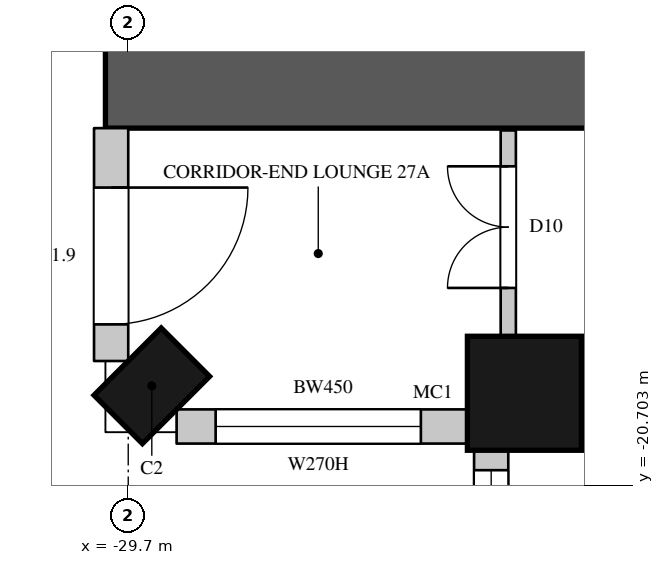
"""IFC4 building model, lengths in metres.
Left out: names, types, materials, properties, quantities, classifications, styles, units other than length and angle.
Written with IfcOpenShell. Run it as: python <this file> out.ifc"""

import sys

from ifc_helpers import new_model, si_unit, direction, frame, frame_2d, origin, origin_2d, place, context, subcontext, project, spatial, rectangle, circle, extrude, element, fill, save


model = new_model("IFC4")
c1 = context("Model", 3, precision=1e-05, world=origin(), true_north=direction((0.0, 1.0)))
c2 = subcontext(c1, "Body", "Model", "MODEL_VIEW")
j1 = project(units=[si_unit("LENGTHUNIT", "METRE"), si_unit("PLANEANGLEUNIT", "RADIAN")], contexts=[c1])
p1 = place(None, origin())
s1 = spatial("IfcSite", under=j1, at=p1, CompositionType="ELEMENT")
p2 = place(p1, origin())
s2 = spatial("IfcBuilding", under=s1, at=p2, CompositionType="ELEMENT")
p3 = place(p2, frame((0.0, 0.0, 127.5)))
s3 = spatial("IfcBuildingStorey", under=s2, at=p3, CompositionType="ELEMENT", Elevation=127.5)
p4 = place(p3, frame((-29.39, -19.39, 0.0), z_axis=(0.0, 0.0, 1.0), x_axis=(0.707106781187, -0.707106781187, 0.0)))
e1 = element("IfcColumn", 1, at=p4, inside=s3, PredefinedType="COLUMN", context=c2, shape_type="SweptSolid", body=[
    extrude(rectangle(XDim=0.9, YDim=1.25, at=origin_2d()), origin(), (0.0, 0.0, 1.0), 3.6),
])
p5 = place(p3, frame((-24.488, -19.488, 0.0), z_axis=(0.0, 0.0, 1.0), x_axis=(1.0, 0.0, 0.0)))
e2 = element("IfcColumn", 2, at=p5, inside=s3, PredefinedType="COLUMN", context=c2, shape_type="SweptSolid", body=[
    extrude(circle(Radius=0.75, at=origin_2d()), origin(), (0.0, 0.0, 1.0), 3.6),
])
p6 = place(p3, frame((-29.925, -16.0, 0.0), z_axis=(0.0, 0.0, 1.0), x_axis=(0.0, -1.0, 0.0)))
e3 = element("IfcWall", 3, at=p6, inside=s3, PredefinedType="SOLIDWALL", context=c2, shape_type="SweptSolid", body=[
    extrude(rectangle(XDim=3.064, YDim=0.45, at=frame_2d((1.532, 0.0))), origin(), (0.0, 0.0, 1.0), 3.3),
])
p7 = place(p6, frame((0.782, 0.0, 0.0)))
e4 = element("IfcOpeningElement", 4, at=p7, cuts=e3, PredefinedType="OPENING", context=c2, shape_type="SweptSolid", body=[
    extrude(rectangle(XDim=1.8, YDim=2.4, at=frame_2d((0.9, 1.2))), frame((0.0, 0.235, 0.0), z_axis=(0.0, -1.0, 0.0), x_axis=(1.0, 0.0, 0.0)), (0.0, 0.0, 1.0), 0.47),
])
p8 = place(p3, frame((-29.064, -19.925, 0.0), z_axis=(0.0, 0.0, 1.0), x_axis=(1.0, 0.0, 0.0)))
e5 = element("IfcWall", 5, at=p8, inside=s3, PredefinedType="SOLIDWALL", context=c2, shape_type="SweptSolid", body=[
    extrude(rectangle(XDim=3.857, YDim=0.45, at=frame_2d((1.928, 0.0))), origin(), (0.0, 0.0, 1.0), 3.3),
])
p9 = place(p8, frame((0.514, 0.0, 1.05)))
e6 = element("IfcOpeningElement", 6, at=p9, cuts=e5, PredefinedType="OPENING", context=c2, shape_type="SweptSolid", body=[
    extrude(rectangle(XDim=2.7, YDim=2.0, at=frame_2d((1.35, 1.0))), frame((0.0, 0.235, 0.0), z_axis=(0.0, -1.0, 0.0), x_axis=(1.0, 0.0, 0.0)), (0.0, 0.0, 1.0), 0.47),
])
p10 = place(p3, frame((-24.925, -20.207, 0.0), z_axis=(0.0, 0.0, 1.0), x_axis=(0.0, -1.0, 0.0)))
e7 = element("IfcWall", 7, at=p10, inside=s3, PredefinedType="SOLIDWALL", context=c2, shape_type="SweptSolid", body=[
    extrude(rectangle(XDim=1.843, YDim=0.45, at=frame_2d((0.921, 0.0))), origin(), (0.0, 0.0, 1.0), 3.3),
])
p11 = place(p10, frame((0.293, 0.0, 1.05)))
e8 = element("IfcOpeningElement", 8, at=p11, cuts=e7, PredefinedType="OPENING", context=c2, shape_type="SweptSolid", body=[
    extrude(rectangle(XDim=1.2, YDim=2.0, at=frame_2d((0.6, 1.0))), frame((0.0, 0.235, 0.0), z_axis=(0.0, -1.0, 0.0), x_axis=(1.0, 0.0, 0.0)), (0.0, 0.0, 1.0), 0.47),
])
p12 = place(p3, frame((-30.0, -15.4, 0.0), z_axis=(0.0, 0.0, 1.0), x_axis=(1.0, 0.0, 0.0)))
e9 = element("IfcWall", 9, at=p12, inside=s3, PredefinedType="SHEAR", context=c2, shape_type="SweptSolid", body=[
    extrude(rectangle(XDim=16.0, YDim=1.2, at=frame_2d((8.0, 0.0))), origin(), (0.0, 0.0, 1.0), 3.6),
])
p13 = place(p12, frame((13.4, 0.0, 0.0)))
e10 = element("IfcOpeningElement", 10, at=p13, cuts=e9, PredefinedType="OPENING", context=c2, shape_type="SweptSolid", body=[
    extrude(rectangle(XDim=1.5, YDim=2.4, at=frame_2d((0.75, 1.2))), frame((0.0, 0.61, 0.0), z_axis=(0.0, -1.0, 0.0), x_axis=(1.0, 0.0, 0.0)), (0.0, 0.0, 1.0), 1.22),
])
p14 = place(p3, frame((-24.7, -18.752, 0.0), z_axis=(0.0, 0.0, 1.0), x_axis=(0.0, 1.0, 0.0)))
e11 = element("IfcWall", 11, at=p14, inside=s3, PredefinedType="PARTITIONING", context=c2, shape_type="SweptSolid", body=[
    extrude(rectangle(XDim=2.722, YDim=0.2, at=frame_2d((1.361, 0.0))), origin(), (0.0, 0.0, 1.0), 3.3),
])
p15 = place(p14, frame((0.65, 0.0, 0.0)))
e12 = element("IfcOpeningElement", 12, at=p15, cuts=e11, PredefinedType="OPENING", context=c2, shape_type="SweptSolid", body=[
    extrude(rectangle(XDim=1.6, YDim=2.4, at=frame_2d((0.8, 1.2))), frame((0.0, 0.11, 0.0), z_axis=(0.0, -1.0, 0.0), x_axis=(1.0, 0.0, 0.0)), (0.0, 0.0, 1.0), 0.22),
])
p16 = place(p3, frame((-23.752, -19.7, 0.0), z_axis=(0.0, 0.0, 1.0), x_axis=(1.0, 0.0, 0.0)))
e13 = element("IfcWall", 13, at=p16, inside=s3, PredefinedType="PARTITIONING", context=c2, shape_type="SweptSolid", body=[
    extrude(rectangle(XDim=3.152, YDim=0.2, at=frame_2d((1.576, 0.0))), origin(), (0.0, 0.0, 1.0), 3.3),
])
p17 = place(p16, frame((1.9, 0.0, 0.0)))
e14 = element("IfcOpeningElement", 14, at=p17, cuts=e13, PredefinedType="OPENING", context=c2, shape_type="SweptSolid", body=[
    extrude(rectangle(XDim=0.95, YDim=2.2, at=frame_2d((0.475, 1.1))), frame((0.0, 0.11, 0.0), z_axis=(0.0, -1.0, 0.0), x_axis=(1.0, 0.0, 0.0)), (0.0, 0.0, 1.0), 0.22),
])
p18 = place(p7, origin())
e15 = element("IfcDoor", 15, at=p18, inside=s3, OperationType="SLIDING_TO_LEFT", PredefinedType="DOOR", context=c2, shape_type="SweptSolid", body=[
    extrude(rectangle(XDim=1.8, YDim=2.4, at=frame_2d((0.9, 1.2))), frame((0.0, 0.13, 0.0), z_axis=(0.0, -1.0, 0.0), x_axis=(1.0, 0.0, 0.0)), (0.0, 0.0, 1.0), 0.05),
])
fill(e4, e15)
p19 = place(p9, origin())
e16 = element("IfcWindow", 16, at=p19, inside=s3, PartitioningType="SINGLE_PANEL", PredefinedType="WINDOW", context=c2, shape_type="SweptSolid", body=[
    extrude(rectangle(XDim=2.7, YDim=2.0, at=frame_2d((1.35, 1.0))), frame((0.0, 0.135, 0.0), z_axis=(0.0, -1.0, 0.0), x_axis=(1.0, 0.0, 0.0)), (0.0, 0.0, 1.0), 0.06),
])
fill(e6, e16)
p20 = place(p11, origin())
e17 = element("IfcWindow", 17, at=p20, inside=s3, PartitioningType="SINGLE_PANEL", PredefinedType="WINDOW", context=c2, shape_type="SweptSolid", body=[
    extrude(rectangle(XDim=1.2, YDim=2.0, at=frame_2d((0.6, 1.0))), frame((0.0, 0.135, 0.0), z_axis=(0.0, -1.0, 0.0), x_axis=(1.0, 0.0, 0.0)), (0.0, 0.0, 1.0), 0.06),
])
fill(e8, e17)
p21 = place(p15, origin())
e18 = element("IfcDoor", 18, at=p21, inside=s3, OperationType="DOUBLE_DOOR_SINGLE_SWING", PredefinedType="DOOR", context=c2, shape_type="SweptSolid", body=[
    extrude(rectangle(XDim=1.6, YDim=2.4, at=frame_2d((0.8, 1.2))), frame((0.0, 0.025, 0.0), z_axis=(0.0, -1.0, 0.0), x_axis=(1.0, 0.0, 0.0)), (0.0, 0.0, 1.0), 0.05),
])
fill(e12, e18)
save(model, sys.argv[1])
